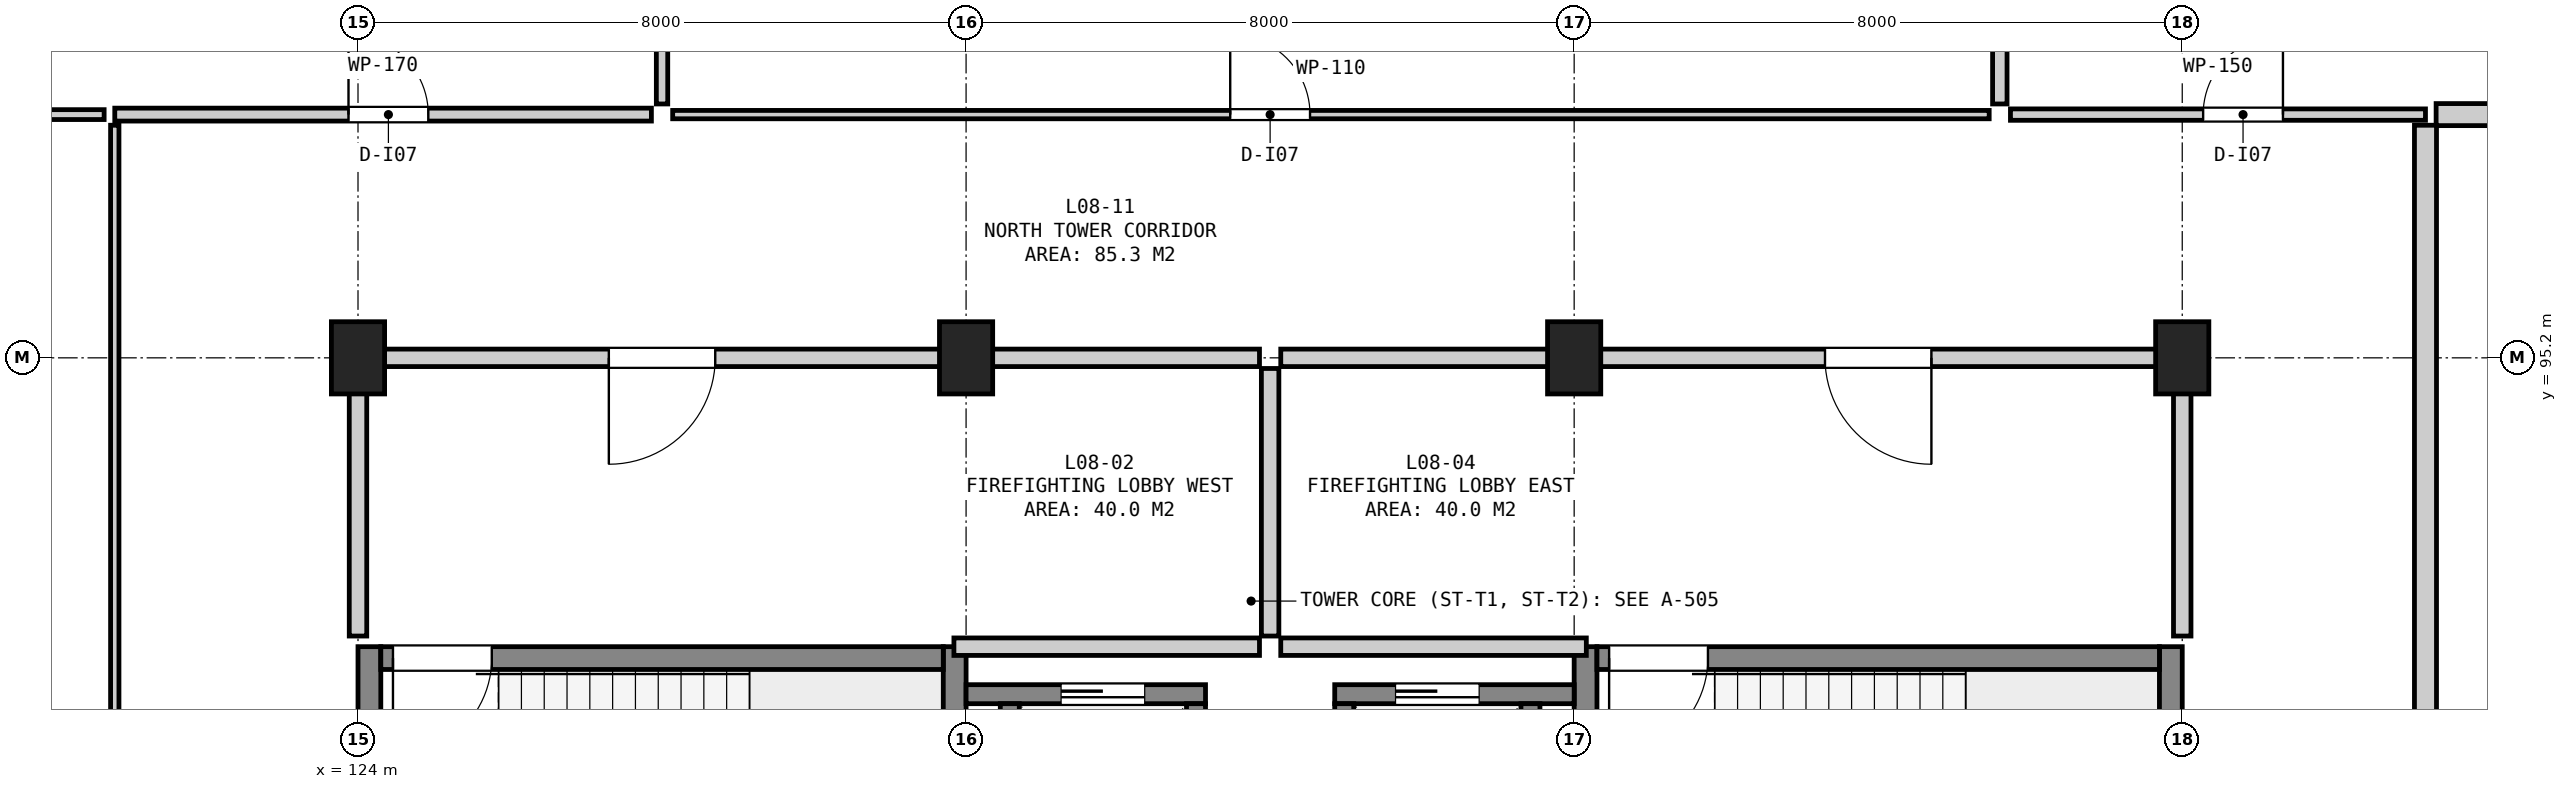
"""IFC4 building model, lengths in metres.
Left out: names, types, materials, properties, quantities, classifications, styles, units other than length and angle.
Written with IfcOpenShell. Run it as: python <this file> out.ifc"""

import sys

from ifc_helpers import new_model, si_unit, direction, frame, frame_2d, origin, origin_2d, place, context, subcontext, project, spatial, rectangle, extrude, element, fill, save


model = new_model("IFC4")
c1 = context("Model", 3, precision=1e-05, world=origin(), true_north=direction((0.0, 1.0)))
c2 = subcontext(c1, "Body", "Model", "MODEL_VIEW")
j1 = project(units=[si_unit("LENGTHUNIT", "METRE"), si_unit("PLANEANGLEUNIT", "RADIAN")], contexts=[c1])
p1 = place(None, origin())
s1 = spatial("IfcSite", under=j1, at=p1, CompositionType="ELEMENT")
p2 = place(p1, origin())
s2 = spatial("IfcBuilding", under=s1, at=p2, CompositionType="ELEMENT")
p3 = place(p2, frame((0.0, 0.0, 35.6)))
s3 = spatial("IfcBuildingStorey", under=s2, at=p3, CompositionType="ELEMENT", Elevation=35.6)
for number, where, z_axis, x_axis in (
    (1, (124.0, 95.2, 0.0), (0.0, 0.0, 1.0), (1.0, 0.0, 0.0)),
    (2, (132.0, 95.2, 0.0), (0.0, 0.0, 1.0), (1.0, 0.0, 0.0)),
    (3, (140.0, 95.2, 0.0), (0.0, 0.0, 1.0), (1.0, 0.0, 0.0)),
    (4, (148.0, 95.2, 0.0), (0.0, 0.0, 1.0), (1.0, 0.0, 0.0)),
):
    element("IfcColumn", number, at=place(p3, frame(where, z_axis=z_axis, x_axis=x_axis)), inside=s3, PredefinedType="COLUMN", context=c2, shape_type="SweptSolid", body=[
        extrude(rectangle(XDim=0.7, YDim=0.95, at=origin_2d()), origin(), (0.0, 0.0, 1.0), 3.9),
    ])
for number, where, z_axis, x_axis in (
    (5, (124.15, 87.2, 0.0), (0.0, 0.0, 1.0), (0.0, 1.0, 0.0)),
    (6, (131.85, 87.2, 0.0), (0.0, 0.0, 1.0), (0.0, 1.0, 0.0)),
):
    element("IfcWall", number, at=place(p3, frame(where, z_axis=z_axis, x_axis=x_axis)), inside=s3, PredefinedType="SHEAR", context=c2, shape_type="SweptSolid", body=[
        extrude(rectangle(XDim=4.2, YDim=0.3, at=frame_2d((2.1, 0.0))), origin(), (0.0, 0.0, 1.0), 3.62),
    ])
p4 = place(p3, frame((124.3, 91.25, 0.0), z_axis=(0.0, 0.0, 1.0), x_axis=(1.0, 0.0, 0.0)))
e7 = element("IfcWall", 7, at=p4, inside=s3, PredefinedType="SHEAR", context=c2, shape_type="SweptSolid", body=[
    extrude(rectangle(XDim=7.4, YDim=0.3, at=frame_2d((3.7, 0.0))), origin(), (0.0, 0.0, 1.0), 3.62),
])
p5 = place(p4, frame((0.16, 0.0, 0.0)))
e8 = element("IfcOpeningElement", 8, at=p5, cuts=e7, PredefinedType="OPENING", context=c2, shape_type="SweptSolid", body=[
    extrude(rectangle(XDim=1.3, YDim=2.18, at=frame_2d((0.65, 1.09))), frame((0.0, 0.162, 0.0), z_axis=(0.0, -1.0, 0.0), x_axis=(1.0, 0.0, 0.0)), (0.0, 0.0, 1.0), 0.324),
])
for number, where, z_axis, x_axis in (
    (9, (140.15, 87.2, 0.0), (0.0, 0.0, 1.0), (0.0, 1.0, 0.0)),
    (10, (147.85, 87.2, 0.0), (0.0, 0.0, 1.0), (0.0, 1.0, 0.0)),
):
    element("IfcWall", number, at=place(p3, frame(where, z_axis=z_axis, x_axis=x_axis)), inside=s3, PredefinedType="SHEAR", context=c2, shape_type="SweptSolid", body=[
        extrude(rectangle(XDim=4.2, YDim=0.3, at=frame_2d((2.1, 0.0))), origin(), (0.0, 0.0, 1.0), 3.62),
    ])
p6 = place(p3, frame((140.3, 91.25, 0.0), z_axis=(0.0, 0.0, 1.0), x_axis=(1.0, 0.0, 0.0)))
e11 = element("IfcWall", 11, at=p6, inside=s3, PredefinedType="SHEAR", context=c2, shape_type="SweptSolid", body=[
    extrude(rectangle(XDim=7.4, YDim=0.3, at=frame_2d((3.7, 0.0))), origin(), (0.0, 0.0, 1.0), 3.62),
])
p7 = place(p6, frame((0.16, 0.0, 0.0)))
e12 = element("IfcOpeningElement", 12, at=p7, cuts=e11, PredefinedType="OPENING", context=c2, shape_type="SweptSolid", body=[
    extrude(rectangle(XDim=1.3, YDim=2.18, at=frame_2d((0.65, 1.09))), frame((0.0, 0.162, 0.0), z_axis=(0.0, -1.0, 0.0), x_axis=(1.0, 0.0, 0.0)), (0.0, 0.0, 1.0), 0.324),
])
p8 = place(p3, frame((132.0, 90.775, 0.0), z_axis=(0.0, 0.0, 1.0), x_axis=(1.0, 0.0, 0.0)))
e13 = element("IfcWall", 13, at=p8, inside=s3, PredefinedType="SHEAR", context=c2, shape_type="SweptSolid", body=[
    extrude(rectangle(XDim=3.15, YDim=0.25, at=frame_2d((1.575, 0.0))), origin(), (0.0, 0.0, 1.0), 3.62),
])
p9 = place(p8, frame((1.25, 0.0, 0.0)))
e14 = element("IfcOpeningElement", 14, at=p9, cuts=e13, PredefinedType="OPENING", context=c2, shape_type="SweptSolid", body=[
    extrude(rectangle(XDim=1.1, YDim=2.15, at=frame_2d((0.55, 1.075))), frame((0.0, 0.137, 0.0), z_axis=(0.0, -1.0, 0.0), x_axis=(1.0, 0.0, 0.0)), (0.0, 0.0, 1.0), 0.274),
])
for number, where, z_axis, x_axis in (
    (15, (132.575, 87.75, 0.0), (0.0, 0.0, 1.0), (0.0, 1.0, 0.0)),
    (16, (135.025, 87.75, 0.0), (0.0, 0.0, 1.0), (0.0, 1.0, 0.0)),
):
    element("IfcWall", number, at=place(p3, frame(where, z_axis=z_axis, x_axis=x_axis)), inside=s3, PredefinedType="SHEAR", context=c2, shape_type="SweptSolid", body=[
        extrude(rectangle(XDim=2.9, YDim=0.25, at=frame_2d((1.45, 0.0))), origin(), (0.0, 0.0, 1.0), 3.62),
    ])
p10 = place(p3, frame((136.85, 90.775, 0.0), z_axis=(0.0, 0.0, 1.0), x_axis=(1.0, 0.0, 0.0)))
e17 = element("IfcWall", 17, at=p10, inside=s3, PredefinedType="SHEAR", context=c2, shape_type="SweptSolid", body=[
    extrude(rectangle(XDim=3.15, YDim=0.25, at=frame_2d((1.575, 0.0))), origin(), (0.0, 0.0, 1.0), 3.62),
])
p11 = place(p10, frame((0.8, 0.0, 0.0)))
e18 = element("IfcOpeningElement", 18, at=p11, cuts=e17, PredefinedType="OPENING", context=c2, shape_type="SweptSolid", body=[
    extrude(rectangle(XDim=1.1, YDim=2.15, at=frame_2d((0.55, 1.075))), frame((0.0, 0.137, 0.0), z_axis=(0.0, -1.0, 0.0), x_axis=(1.0, 0.0, 0.0)), (0.0, 0.0, 1.0), 0.274),
])
for number, where, z_axis, x_axis in (
    (19, (136.975, 87.75, 0.0), (0.0, 0.0, 1.0), (0.0, 1.0, 0.0)),
    (20, (139.425, 87.75, 0.0), (0.0, 0.0, 1.0), (0.0, 1.0, 0.0)),
):
    element("IfcWall", number, at=place(p3, frame(where, z_axis=z_axis, x_axis=x_axis)), inside=s3, PredefinedType="SHEAR", context=c2, shape_type="SweptSolid", body=[
        extrude(rectangle(XDim=2.9, YDim=0.25, at=frame_2d((1.45, 0.0))), origin(), (0.0, 0.0, 1.0), 3.62),
    ])
p12 = place(p3, frame((131.84, 91.4, 0.0), z_axis=(0.0, 0.0, 1.0), x_axis=(1.0, 0.0, 0.0)))
e21 = element("IfcWall", 21, at=p12, inside=s3, PredefinedType="SOLIDWALL", context=c2, shape_type="SweptSolid", body=[
    extrude(rectangle(XDim=4.02, YDim=0.23, at=frame_2d((2.01, 0.0))), origin(), (0.0, 0.0, 1.0), 3.62),
])
p13 = place(p3, frame((124.14, 95.2, 0.0), z_axis=(0.0, 0.0, 1.0), x_axis=(1.0, 0.0, 0.0)))
e22 = element("IfcWall", 22, at=p13, inside=s3, PredefinedType="SOLIDWALL", context=c2, shape_type="SweptSolid", body=[
    extrude(rectangle(XDim=11.72, YDim=0.23, at=frame_2d((5.86, 0.0))), origin(), (0.0, 0.0, 1.0), 2.745),
])
p14 = place(p13, frame((3.16, 0.0, 0.0)))
e23 = element("IfcOpeningElement", 23, at=p14, cuts=e22, PredefinedType="OPENING", context=c2, shape_type="SweptSolid", body=[
    extrude(rectangle(XDim=1.4, YDim=2.2, at=frame_2d((0.7, 1.1))), frame((0.0, 0.127, 0.0), z_axis=(0.0, -1.0, 0.0), x_axis=(1.0, 0.0, 0.0)), (0.0, 0.0, 1.0), 0.254),
])
p15 = place(p3, frame((124.0, 91.54, 0.0), z_axis=(0.0, 0.0, 1.0), x_axis=(0.0, 1.0, 0.0)))
e24 = element("IfcWall", 24, at=p15, inside=s3, PredefinedType="SOLIDWALL", context=c2, shape_type="SweptSolid", body=[
    extrude(rectangle(XDim=3.52, YDim=0.23, at=frame_2d((1.76, 0.0))), origin(), (0.0, 0.0, 1.0), 2.745),
])
p16 = place(p3, frame((136.0, 91.54, 0.0), z_axis=(0.0, 0.0, 1.0), x_axis=(0.0, 1.0, 0.0)))
e25 = element("IfcWall", 25, at=p16, inside=s3, PredefinedType="SOLIDWALL", context=c2, shape_type="SweptSolid", body=[
    extrude(rectangle(XDim=3.52, YDim=0.23, at=frame_2d((1.76, 0.0))), origin(), (0.0, 0.0, 1.0), 3.62),
])
p17 = place(p3, frame((136.14, 91.4, 0.0), z_axis=(0.0, 0.0, 1.0), x_axis=(1.0, 0.0, 0.0)))
e26 = element("IfcWall", 26, at=p17, inside=s3, PredefinedType="SOLIDWALL", context=c2, shape_type="SweptSolid", body=[
    extrude(rectangle(XDim=4.02, YDim=0.23, at=frame_2d((2.01, 0.0))), origin(), (0.0, 0.0, 1.0), 3.62),
])
p18 = place(p3, frame((136.14, 95.2, 0.0), z_axis=(0.0, 0.0, 1.0), x_axis=(1.0, 0.0, 0.0)))
e27 = element("IfcWall", 27, at=p18, inside=s3, PredefinedType="SOLIDWALL", context=c2, shape_type="SweptSolid", body=[
    extrude(rectangle(XDim=11.72, YDim=0.23, at=frame_2d((5.86, 0.0))), origin(), (0.0, 0.0, 1.0), 2.795),
])
p19 = place(p18, frame((7.16, 0.0, 0.0)))
e28 = element("IfcOpeningElement", 28, at=p19, cuts=e27, PredefinedType="OPENING", context=c2, shape_type="SweptSolid", body=[
    extrude(rectangle(XDim=1.4, YDim=2.2, at=frame_2d((0.7, 1.1))), frame((0.0, 0.127, 0.0), z_axis=(0.0, -1.0, 0.0), x_axis=(1.0, 0.0, 0.0)), (0.0, 0.0, 1.0), 0.254),
])
p20 = place(p3, frame((148.0, 91.54, 0.0), z_axis=(0.0, 0.0, 1.0), x_axis=(0.0, 1.0, 0.0)))
e29 = element("IfcWall", 29, at=p20, inside=s3, PredefinedType="SOLIDWALL", context=c2, shape_type="SweptSolid", body=[
    extrude(rectangle(XDim=3.52, YDim=0.23, at=frame_2d((1.76, 0.0))), origin(), (0.0, 0.0, 1.0), 3.045),
])
p21 = place(p3, frame((151.34, 98.4, 0.0), z_axis=(0.0, 0.0, 1.0), x_axis=(1.0, 0.0, 0.0)))
e30 = element("IfcWall", 30, at=p21, inside=s3, PredefinedType="SOLIDWALL", context=c2, shape_type="SweptSolid", body=[
    extrude(rectangle(XDim=16.565, YDim=0.29, at=frame_2d((8.282, 0.0))), origin(), (0.0, 0.0, 1.0), 3.62),
])
p22 = place(p3, frame((151.2, 76.0, 0.0), z_axis=(0.0, 0.0, 1.0), x_axis=(0.0, 1.0, 0.0)))
e31 = element("IfcWall", 31, at=p22, inside=s3, PredefinedType="SOLIDWALL", context=c2, shape_type="SweptSolid", body=[
    extrude(rectangle(XDim=22.26, YDim=0.29, at=frame_2d((11.13, 0.0))), origin(), (0.0, 0.0, 1.0), 3.62),
])
p23 = place(p22, frame((10.5, 0.0, 0.0)))
e32 = element("IfcOpeningElement", 32, at=p23, cuts=e31, PredefinedType="OPENING", context=c2, shape_type="SweptSolid", body=[
    extrude(rectangle(XDim=1.4, YDim=2.2, at=frame_2d((0.7, 1.1))), frame((0.0, 0.157, 0.0), z_axis=(0.0, -1.0, 0.0), x_axis=(1.0, 0.0, 0.0)), (0.0, 0.0, 1.0), 0.314),
])
p24 = place(p3, frame((110.495, 98.4, 0.0), z_axis=(0.0, 0.0, 1.0), x_axis=(1.0, 0.0, 0.0)))
e33 = element("IfcWall", 33, at=p24, inside=s3, PredefinedType="PARTITIONING", context=c2, shape_type="SweptSolid", body=[
    extrude(rectangle(XDim=10.165, YDim=0.13, at=frame_2d((5.083, 0.0))), origin(), (0.0, 0.0, 1.0), 3.62),
])
p25 = place(p3, frame((120.8, 76.14, 0.0), z_axis=(0.0, 0.0, 1.0), x_axis=(0.0, 1.0, 0.0)))
e34 = element("IfcWall", 34, at=p25, inside=s3, PredefinedType="PARTITIONING", context=c2, shape_type="SweptSolid", body=[
    extrude(rectangle(XDim=22.12, YDim=0.11, at=frame_2d((11.06, 0.0))), origin(), (0.0, 0.0, 1.0), 3.62),
])
p26 = place(p25, frame((10.535, 0.0, 0.0)))
e35 = element("IfcOpeningElement", 35, at=p26, cuts=e34, PredefinedType="OPENING", context=c2, shape_type="SweptSolid", body=[
    extrude(rectangle(XDim=1.05, YDim=2.15, at=frame_2d((0.525, 1.075))), frame((0.0, 0.067, 0.0), z_axis=(0.0, -1.0, 0.0), x_axis=(1.0, 0.0, 0.0)), (0.0, 0.0, 1.0), 0.134),
])
p27 = place(p3, frame((120.8, 98.4, 0.0), z_axis=(0.0, 0.0, 1.0), x_axis=(1.0, 0.0, 0.0)))
e36 = element("IfcWall", 36, at=p27, inside=s3, PredefinedType="PARTITIONING", context=c2, shape_type="SweptSolid", body=[
    extrude(rectangle(XDim=7.06, YDim=0.17, at=frame_2d((3.53, 0.0))), origin(), (0.0, 0.0, 1.0), 3.62),
])
p28 = place(p27, frame((3.075, 0.0, 0.0)))
e37 = element("IfcOpeningElement", 37, at=p28, cuts=e36, PredefinedType="OPENING", context=c2, shape_type="SweptSolid", body=[
    extrude(rectangle(XDim=1.05, YDim=2.15, at=frame_2d((0.525, 1.075))), frame((0.0, 0.097, 0.0), z_axis=(0.0, -1.0, 0.0), x_axis=(1.0, 0.0, 0.0)), (0.0, 0.0, 1.0), 0.194),
])
p29 = place(p3, frame((128.0, 98.54, 0.0), z_axis=(0.0, 0.0, 1.0), x_axis=(0.0, 1.0, 0.0)))
e38 = element("IfcWall", 38, at=p29, inside=s3, PredefinedType="PARTITIONING", context=c2, shape_type="SweptSolid", body=[
    extrude(rectangle(XDim=16.565, YDim=0.15, at=frame_2d((8.282, 0.0))), origin(), (0.0, 0.0, 1.0), 3.62),
])
p30 = place(p3, frame((128.14, 98.4, 0.0), z_axis=(0.0, 0.0, 1.0), x_axis=(1.0, 0.0, 0.0)))
e39 = element("IfcWall", 39, at=p30, inside=s3, PredefinedType="PARTITIONING", context=c2, shape_type="SweptSolid", body=[
    extrude(rectangle(XDim=17.32, YDim=0.11, at=frame_2d((8.66, 0.0))), origin(), (0.0, 0.0, 1.0), 3.62),
])
p31 = place(p30, frame((7.335, 0.0, 0.0)))
e40 = element("IfcOpeningElement", 40, at=p31, cuts=e39, PredefinedType="OPENING", context=c2, shape_type="SweptSolid", body=[
    extrude(rectangle(XDim=1.05, YDim=2.15, at=frame_2d((0.525, 1.075))), frame((0.0, 0.067, 0.0), z_axis=(0.0, -1.0, 0.0), x_axis=(1.0, 0.0, 0.0)), (0.0, 0.0, 1.0), 0.134),
])
p32 = place(p3, frame((145.6, 98.54, 0.0), z_axis=(0.0, 0.0, 1.0), x_axis=(0.0, 1.0, 0.0)))
e41 = element("IfcWall", 41, at=p32, inside=s3, PredefinedType="PARTITIONING", context=c2, shape_type="SweptSolid", body=[
    extrude(rectangle(XDim=16.565, YDim=0.19, at=frame_2d((8.282, 0.0))), origin(), (0.0, 0.0, 1.0), 3.62),
])
p33 = place(p3, frame((145.74, 98.4, 0.0), z_axis=(0.0, 0.0, 1.0), x_axis=(1.0, 0.0, 0.0)))
e42 = element("IfcWall", 42, at=p33, inside=s3, PredefinedType="PARTITIONING", context=c2, shape_type="SweptSolid", body=[
    extrude(rectangle(XDim=5.46, YDim=0.15, at=frame_2d((2.73, 0.0))), origin(), (0.0, 0.0, 1.0), 3.62),
])
p34 = place(p33, frame((2.535, 0.0, 0.0)))
e43 = element("IfcOpeningElement", 43, at=p34, cuts=e42, PredefinedType="OPENING", context=c2, shape_type="SweptSolid", body=[
    extrude(rectangle(XDim=1.05, YDim=2.15, at=frame_2d((0.525, 1.075))), frame((0.0, 0.087, 0.0), z_axis=(0.0, -1.0, 0.0), x_axis=(1.0, 0.0, 0.0)), (0.0, 0.0, 1.0), 0.174),
])
p35 = place(p5, frame((1.3, 0.0, 0.0), z_axis=(0.0, 0.0, 1.0), x_axis=(-1.0, 0.0, 0.0)))
e44 = element("IfcDoor", 44, at=p35, inside=s3, OperationType="SINGLE_SWING_RIGHT", PredefinedType="DOOR", context=c2, shape_type="SweptSolid", body=[
    extrude(rectangle(XDim=1.3, YDim=2.18, at=frame_2d((0.65, 1.09))), frame((0.0, 0.025, 0.0), z_axis=(0.0, -1.0, 0.0), x_axis=(1.0, 0.0, 0.0)), (0.0, 0.0, 1.0), 0.05),
])
fill(e8, e44)
p36 = place(p7, frame((1.3, 0.0, 0.0), z_axis=(0.0, 0.0, 1.0), x_axis=(-1.0, 0.0, 0.0)))
e45 = element("IfcDoor", 45, at=p36, inside=s3, OperationType="SINGLE_SWING_RIGHT", PredefinedType="DOOR", context=c2, shape_type="SweptSolid", body=[
    extrude(rectangle(XDim=1.3, YDim=2.18, at=frame_2d((0.65, 1.09))), frame((0.0, 0.025, 0.0), z_axis=(0.0, -1.0, 0.0), x_axis=(1.0, 0.0, 0.0)), (0.0, 0.0, 1.0), 0.05),
])
fill(e12, e45)
p37 = place(p9, origin())
e46 = element("IfcDoor", 46, at=p37, inside=s3, OperationType="SLIDING_TO_LEFT", PredefinedType="DOOR", context=c2, shape_type="SweptSolid", body=[
    extrude(rectangle(XDim=1.1, YDim=2.15, at=frame_2d((0.55, 1.075))), frame((0.0, 0.025, 0.0), z_axis=(0.0, -1.0, 0.0), x_axis=(1.0, 0.0, 0.0)), (0.0, 0.0, 1.0), 0.05),
])
fill(e14, e46)
p38 = place(p11, origin())
e47 = element("IfcDoor", 47, at=p38, inside=s3, OperationType="SLIDING_TO_LEFT", PredefinedType="DOOR", context=c2, shape_type="SweptSolid", body=[
    extrude(rectangle(XDim=1.1, YDim=2.15, at=frame_2d((0.55, 1.075))), frame((0.0, 0.025, 0.0), z_axis=(0.0, -1.0, 0.0), x_axis=(1.0, 0.0, 0.0)), (0.0, 0.0, 1.0), 0.05),
])
fill(e18, e47)
p39 = place(p14, frame((1.4, 0.0, 0.0), z_axis=(0.0, 0.0, 1.0), x_axis=(-1.0, 0.0, 0.0)))
e48 = element("IfcDoor", 48, at=p39, inside=s3, OperationType="SINGLE_SWING_RIGHT", PredefinedType="DOOR", context=c2, shape_type="SweptSolid", body=[
    extrude(rectangle(XDim=1.4, YDim=2.2, at=frame_2d((0.7, 1.1))), frame((0.0, 0.025, 0.0), z_axis=(0.0, -1.0, 0.0), x_axis=(1.0, 0.0, 0.0)), (0.0, 0.0, 1.0), 0.05),
])
fill(e23, e48)
p40 = place(p19, frame((1.4, 0.0, 0.0), z_axis=(0.0, 0.0, 1.0), x_axis=(-1.0, 0.0, 0.0)))
e49 = element("IfcDoor", 49, at=p40, inside=s3, OperationType="SINGLE_SWING_LEFT", PredefinedType="DOOR", context=c2, shape_type="SweptSolid", body=[
    extrude(rectangle(XDim=1.4, YDim=2.2, at=frame_2d((0.7, 1.1))), frame((0.0, 0.025, 0.0), z_axis=(0.0, -1.0, 0.0), x_axis=(1.0, 0.0, 0.0)), (0.0, 0.0, 1.0), 0.05),
])
fill(e28, e49)
p41 = place(p28, origin())
e50 = element("IfcDoor", 50, at=p41, inside=s3, OperationType="SINGLE_SWING_LEFT", PredefinedType="DOOR", context=c2, shape_type="SweptSolid", body=[
    extrude(rectangle(XDim=1.05, YDim=2.15, at=frame_2d((0.525, 1.075))), frame((0.0, 0.025, 0.0), z_axis=(0.0, -1.0, 0.0), x_axis=(1.0, 0.0, 0.0)), (0.0, 0.0, 1.0), 0.05),
])
fill(e37, e50)
p42 = place(p31, origin())
e51 = element("IfcDoor", 51, at=p42, inside=s3, OperationType="SINGLE_SWING_LEFT", PredefinedType="DOOR", context=c2, shape_type="SweptSolid", body=[
    extrude(rectangle(XDim=1.05, YDim=2.15, at=frame_2d((0.525, 1.075))), frame((0.0, 0.025, 0.0), z_axis=(0.0, -1.0, 0.0), x_axis=(1.0, 0.0, 0.0)), (0.0, 0.0, 1.0), 0.05),
])
fill(e40, e51)
p43 = place(p34, origin())
e52 = element("IfcDoor", 52, at=p43, inside=s3, OperationType="SINGLE_SWING_RIGHT", PredefinedType="DOOR", context=c2, shape_type="SweptSolid", body=[
    extrude(rectangle(XDim=1.05, YDim=2.15, at=frame_2d((0.525, 1.075))), frame((0.0, 0.025, 0.0), z_axis=(0.0, -1.0, 0.0), x_axis=(1.0, 0.0, 0.0)), (0.0, 0.0, 1.0), 0.05),
])
fill(e43, e52)
save(model, sys.argv[1])
